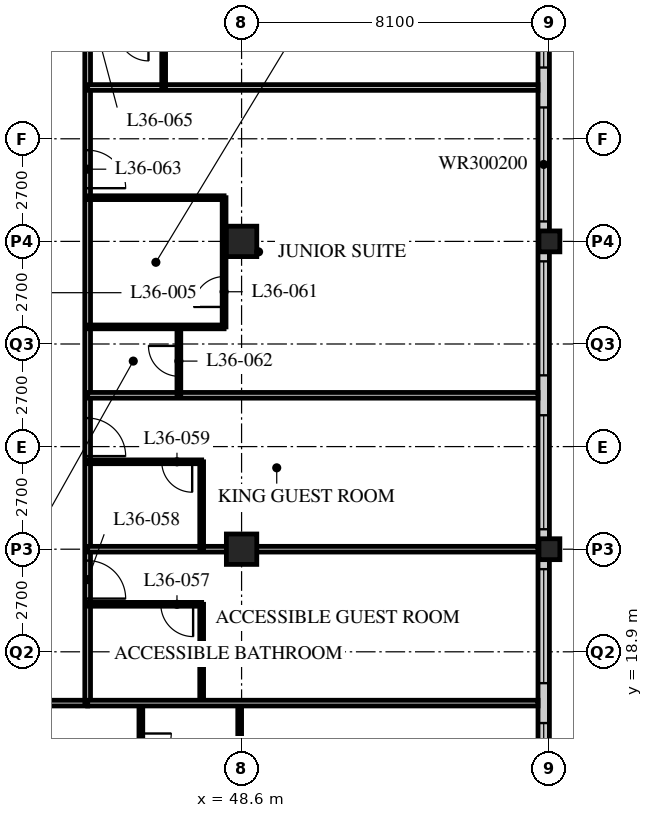
"""IFC4 building model, lengths in metres.
Left out: names, types, materials, properties, quantities, classifications, styles, units other than length and angle.
Written with IfcOpenShell. Run it as: python <this file> out.ifc"""

import sys

from ifc_helpers import new_model, si_unit, direction, frame, frame_2d, origin, origin_2d, place, context, subcontext, project, spatial, rectangle, hollow_rectangle, extrude, element, fill, save


model = new_model("IFC4")
c1 = context("Model", 3, precision=1e-05, world=origin(), true_north=direction((0.0, 1.0)))
c2 = subcontext(c1, "Body", "Model", "MODEL_VIEW")
j1 = project(units=[si_unit("LENGTHUNIT", "METRE"), si_unit("PLANEANGLEUNIT", "RADIAN")], contexts=[c1])
p1 = place(None, origin())
s1 = spatial("IfcSite", under=j1, at=p1, CompositionType="ELEMENT")
p2 = place(p1, origin())
s2 = spatial("IfcBuilding", under=s1, at=p2, CompositionType="ELEMENT")
p3 = place(p2, frame((0.0, 0.0, 140.8)))
s3 = spatial("IfcBuildingStorey", under=s2, at=p3, CompositionType="ELEMENT", Elevation=140.8)
for number, where, z_axis, x_axis in (
    (1, (48.6, 21.6, 0.0), (0.0, 0.0, 1.0), (1.0, 0.0, 0.0)),
    (2, (48.6, 29.7, 0.0), (0.0, 0.0, 1.0), (1.0, 0.0, 0.0)),
):
    element("IfcColumn", number, at=place(p3, frame(where, z_axis=z_axis, x_axis=x_axis)), inside=s3, PredefinedType="COLUMN", context=c2, shape_type="SweptSolid", body=[
        extrude(hollow_rectangle(XDim=0.8, YDim=0.8, WallThickness=0.08, at=origin_2d()), origin(), (0.0, 0.0, 1.0), 3.4),
    ])
for number, where, z_axis, x_axis in (
    (3, (56.7, 21.6, 0.0), (0.0, 0.0, 1.0), (1.0, 0.0, 0.0)),
    (4, (56.7, 29.7, 0.0), (0.0, 0.0, 1.0), (1.0, 0.0, 0.0)),
):
    element("IfcColumn", number, at=place(p3, frame(where, z_axis=z_axis, x_axis=x_axis)), inside=s3, PredefinedType="COLUMN", context=c2, shape_type="SweptSolid", body=[
        extrude(hollow_rectangle(XDim=0.55, YDim=0.55, WallThickness=0.04, at=origin_2d()), origin(), (0.0, 0.0, 1.0), 3.4),
    ])
p4 = place(p3, frame((56.55, 13.8, 0.0), z_axis=(0.0, 0.0, 1.0), x_axis=(0.0, 1.0, 0.0)))
e5 = element("IfcWall", 5, at=p4, inside=s3, PredefinedType="SOLIDWALL", context=c2, shape_type="SweptSolid", body=[
    extrude(rectangle(XDim=32.1, YDim=0.3, at=frame_2d((16.05, 0.0))), origin(), (0.0, 0.0, 1.0), 3.19),
])
p5 = place(p4, frame((0.225, 0.0, 0.9)))
e6 = element("IfcOpeningElement", 6, at=p5, cuts=e5, PredefinedType="OPENING", context=c2, shape_type="SweptSolid", body=[
    extrude(rectangle(XDim=3.0, YDim=2.0, at=frame_2d((1.5, 1.0))), frame((0.0, 0.16, 0.0), z_axis=(0.0, -1.0, 0.0), x_axis=(1.0, 0.0, 0.0)), (0.0, 0.0, 1.0), 0.32),
])
p6 = place(p4, frame((4.275, 0.0, 0.9)))
e7 = element("IfcOpeningElement", 7, at=p6, cuts=e5, PredefinedType="OPENING", context=c2, shape_type="SweptSolid", body=[
    extrude(rectangle(XDim=3.0, YDim=2.0, at=frame_2d((1.5, 1.0))), frame((0.0, 0.16, 0.0), z_axis=(0.0, -1.0, 0.0), x_axis=(1.0, 0.0, 0.0)), (0.0, 0.0, 1.0), 0.32),
])
p7 = place(p4, frame((8.325, 0.0, 0.9)))
e8 = element("IfcOpeningElement", 8, at=p7, cuts=e5, PredefinedType="OPENING", context=c2, shape_type="SweptSolid", body=[
    extrude(rectangle(XDim=3.0, YDim=2.0, at=frame_2d((1.5, 1.0))), frame((0.0, 0.16, 0.0), z_axis=(0.0, -1.0, 0.0), x_axis=(1.0, 0.0, 0.0)), (0.0, 0.0, 1.0), 0.32),
])
p8 = place(p4, frame((12.375, 0.0, 0.9)))
e9 = element("IfcOpeningElement", 9, at=p8, cuts=e5, PredefinedType="OPENING", context=c2, shape_type="SweptSolid", body=[
    extrude(rectangle(XDim=3.0, YDim=2.0, at=frame_2d((1.5, 1.0))), frame((0.0, 0.16, 0.0), z_axis=(0.0, -1.0, 0.0), x_axis=(1.0, 0.0, 0.0)), (0.0, 0.0, 1.0), 0.32),
])
p9 = place(p4, frame((16.425, 0.0, 0.9)))
e10 = element("IfcOpeningElement", 10, at=p9, cuts=e5, PredefinedType="OPENING", context=c2, shape_type="SweptSolid", body=[
    extrude(rectangle(XDim=3.0, YDim=2.0, at=frame_2d((1.5, 1.0))), frame((0.0, 0.16, 0.0), z_axis=(0.0, -1.0, 0.0), x_axis=(1.0, 0.0, 0.0)), (0.0, 0.0, 1.0), 0.32),
])
p10 = place(p4, frame((20.475, 0.0, 0.9)))
e11 = element("IfcOpeningElement", 11, at=p10, cuts=e5, PredefinedType="OPENING", context=c2, shape_type="SweptSolid", body=[
    extrude(rectangle(XDim=3.0, YDim=2.0, at=frame_2d((1.5, 1.0))), frame((0.0, 0.16, 0.0), z_axis=(0.0, -1.0, 0.0), x_axis=(1.0, 0.0, 0.0)), (0.0, 0.0, 1.0), 0.32),
])
p11 = place(p4, frame((24.525, 0.0, 0.9)))
e12 = element("IfcOpeningElement", 12, at=p11, cuts=e5, PredefinedType="OPENING", context=c2, shape_type="SweptSolid", body=[
    extrude(rectangle(XDim=3.0, YDim=2.0, at=frame_2d((1.5, 1.0))), frame((0.0, 0.16, 0.0), z_axis=(0.0, -1.0, 0.0), x_axis=(1.0, 0.0, 0.0)), (0.0, 0.0, 1.0), 0.32),
])
p12 = place(p4, frame((28.575, 0.0, 0.9)))
e13 = element("IfcOpeningElement", 13, at=p12, cuts=e5, PredefinedType="OPENING", context=c2, shape_type="SweptSolid", body=[
    extrude(rectangle(XDim=3.0, YDim=2.0, at=frame_2d((1.5, 1.0))), frame((0.0, 0.16, 0.0), z_axis=(0.0, -1.0, 0.0), x_axis=(1.0, 0.0, 0.0)), (0.0, 0.0, 1.0), 0.32),
])
p13 = place(p3, frame((8.1, 17.55, 0.0), z_axis=(0.0, 0.0, 1.0), x_axis=(1.0, 0.0, 0.0)))
e14 = element("IfcWall", 14, at=p13, inside=s3, PredefinedType="PARTITIONING", context=c2, shape_type="SweptSolid", body=[
    extrude(rectangle(XDim=36.45, YDim=0.15, at=frame_2d((18.225, 0.0))), origin(), (0.0, 0.0, 1.0), 3.19),
])
p14 = place(p13, frame((9.625, 0.0, 0.0)))
e15 = element("IfcOpeningElement", 15, at=p14, cuts=e14, PredefinedType="OPENING", context=c2, shape_type="SweptSolid", body=[
    extrude(rectangle(XDim=1.0, YDim=2.1, at=frame_2d((0.5, 1.05))), frame((0.0, 0.085, 0.0), z_axis=(0.0, -1.0, 0.0), x_axis=(1.0, 0.0, 0.0)), (0.0, 0.0, 1.0), 0.17),
])
p15 = place(p13, frame((18.1, 0.0, 0.0)))
e16 = element("IfcOpeningElement", 16, at=p15, cuts=e14, PredefinedType="OPENING", context=c2, shape_type="SweptSolid", body=[
    extrude(rectangle(XDim=1.0, YDim=2.1, at=frame_2d((0.5, 1.05))), frame((0.0, 0.085, 0.0), z_axis=(0.0, -1.0, 0.0), x_axis=(1.0, 0.0, 0.0)), (0.0, 0.0, 1.0), 0.17),
])
p16 = place(p13, frame((26.75, 0.0, 0.0)))
e17 = element("IfcOpeningElement", 17, at=p16, cuts=e14, PredefinedType="OPENING", context=c2, shape_type="SweptSolid", body=[
    extrude(rectangle(XDim=1.0, YDim=2.1, at=frame_2d((0.5, 1.05))), frame((0.0, 0.085, 0.0), z_axis=(0.0, -1.0, 0.0), x_axis=(1.0, 0.0, 0.0)), (0.0, 0.0, 1.0), 0.17),
])
p17 = place(p13, frame((30.8, 0.0, 0.0)))
e18 = element("IfcOpeningElement", 18, at=p17, cuts=e14, PredefinedType="OPENING", context=c2, shape_type="SweptSolid", body=[
    extrude(rectangle(XDim=1.0, YDim=2.1, at=frame_2d((0.5, 1.05))), frame((0.0, 0.085, 0.0), z_axis=(0.0, -1.0, 0.0), x_axis=(1.0, 0.0, 0.0)), (0.0, 0.0, 1.0), 0.17),
])
p18 = place(p13, frame((1.525, 0.0, 0.0)))
e19 = element("IfcOpeningElement", 19, at=p18, cuts=e14, PredefinedType="OPENING", context=c2, shape_type="SweptSolid", body=[
    extrude(rectangle(XDim=1.0, YDim=2.1, at=frame_2d((0.5, 1.05))), frame((0.0, 0.085, 0.0), z_axis=(0.0, -1.0, 0.0), x_axis=(1.0, 0.0, 0.0)), (0.0, 0.0, 1.0), 0.17),
])
p19 = place(p13, frame((33.925, 0.0, 0.0)))
e20 = element("IfcOpeningElement", 20, at=p19, cuts=e14, PredefinedType="OPENING", context=c2, shape_type="SweptSolid", body=[
    extrude(rectangle(XDim=1.0, YDim=2.1, at=frame_2d((0.5, 1.05))), frame((0.0, 0.085, 0.0), z_axis=(0.0, -1.0, 0.0), x_axis=(1.0, 0.0, 0.0)), (0.0, 0.0, 1.0), 0.17),
])
p20 = place(p3, frame((44.55, 17.55, 0.0), z_axis=(0.0, 0.0, 1.0), x_axis=(0.0, 1.0, 0.0)))
e21 = element("IfcWall", 21, at=p20, inside=s3, PredefinedType="PARTITIONING", context=c2, shape_type="SweptSolid", body=[
    extrude(rectangle(XDim=28.35, YDim=0.15, at=frame_2d((14.175, 0.0))), origin(), (0.0, 0.0, 1.0), 3.19),
])
p21 = place(p20, frame((2.75, 0.0, 0.0)))
e22 = element("IfcOpeningElement", 22, at=p21, cuts=e21, PredefinedType="OPENING", context=c2, shape_type="SweptSolid", body=[
    extrude(rectangle(XDim=1.0, YDim=2.1, at=frame_2d((0.5, 1.05))), frame((0.0, 0.085, 0.0), z_axis=(0.0, -1.0, 0.0), x_axis=(1.0, 0.0, 0.0)), (0.0, 0.0, 1.0), 0.17),
])
p22 = place(p20, frame((6.5, 0.0, 0.0)))
e23 = element("IfcOpeningElement", 23, at=p22, cuts=e21, PredefinedType="OPENING", context=c2, shape_type="SweptSolid", body=[
    extrude(rectangle(XDim=1.0, YDim=2.1, at=frame_2d((0.5, 1.05))), frame((0.0, 0.085, 0.0), z_axis=(0.0, -1.0, 0.0), x_axis=(1.0, 0.0, 0.0)), (0.0, 0.0, 1.0), 0.17),
])
p23 = place(p20, frame((13.55, 0.0, 0.0)))
e24 = element("IfcOpeningElement", 24, at=p23, cuts=e21, PredefinedType="OPENING", context=c2, shape_type="SweptSolid", body=[
    extrude(rectangle(XDim=1.0, YDim=2.1, at=frame_2d((0.5, 1.05))), frame((0.0, 0.085, 0.0), z_axis=(0.0, -1.0, 0.0), x_axis=(1.0, 0.0, 0.0)), (0.0, 0.0, 1.0), 0.17),
])
p24 = place(p20, frame((18.1, 0.0, 0.0)))
e25 = element("IfcOpeningElement", 25, at=p24, cuts=e21, PredefinedType="OPENING", context=c2, shape_type="SweptSolid", body=[
    extrude(rectangle(XDim=1.0, YDim=2.1, at=frame_2d((0.5, 1.05))), frame((0.0, 0.085, 0.0), z_axis=(0.0, -1.0, 0.0), x_axis=(1.0, 0.0, 0.0)), (0.0, 0.0, 1.0), 0.17),
])
p25 = place(p20, frame((26.75, 0.0, 0.0)))
e26 = element("IfcOpeningElement", 26, at=p25, cuts=e21, PredefinedType="OPENING", context=c2, shape_type="SweptSolid", body=[
    extrude(rectangle(XDim=1.0, YDim=2.1, at=frame_2d((0.5, 1.05))), frame((0.0, 0.085, 0.0), z_axis=(0.0, -1.0, 0.0), x_axis=(1.0, 0.0, 0.0)), (0.0, 0.0, 1.0), 0.17),
])
p26 = place(p3, frame((47.55, 17.55, 0.0), z_axis=(0.0, 0.0, 1.0), x_axis=(0.0, 1.0, 0.0)))
e27 = element("IfcWall", 27, at=p26, inside=s3, PredefinedType="PARTITIONING", context=c2, shape_type="SweptSolid", body=[
    extrude(rectangle(XDim=2.6, YDim=0.1, at=frame_2d((1.3, 0.0))), origin(), (0.0, 0.0, 1.0), 3.19),
])
p27 = place(p3, frame((44.55, 20.15, 0.0), z_axis=(0.0, 0.0, 1.0), x_axis=(1.0, 0.0, 0.0)))
e28 = element("IfcWall", 28, at=p27, inside=s3, PredefinedType="PARTITIONING", context=c2, shape_type="SweptSolid", body=[
    extrude(rectangle(XDim=3.0, YDim=0.1, at=frame_2d((1.5, 0.0))), origin(), (0.0, 0.0, 1.0), 3.19),
])
p28 = place(p27, frame((1.925, 0.0, 0.0)))
e29 = element("IfcOpeningElement", 29, at=p28, cuts=e28, PredefinedType="OPENING", context=c2, shape_type="SweptSolid", body=[
    extrude(rectangle(XDim=0.85, YDim=2.1, at=frame_2d((0.425, 1.05))), frame((0.0, 0.06, 0.0), z_axis=(0.0, -1.0, 0.0), x_axis=(1.0, 0.0, 0.0)), (0.0, 0.0, 1.0), 0.12),
])
p29 = place(p3, frame((44.55, 21.6, 0.0), z_axis=(0.0, 0.0, 1.0), x_axis=(1.0, 0.0, 0.0)))
e30 = element("IfcWall", 30, at=p29, inside=s3, PredefinedType="PARTITIONING", context=c2, shape_type="SweptSolid", body=[
    extrude(rectangle(XDim=11.85, YDim=0.15, at=frame_2d((5.925, 0.0))), origin(), (0.0, 0.0, 1.0), 2.578),
])
p30 = place(p3, frame((47.55, 21.6, 0.0), z_axis=(0.0, 0.0, 1.0), x_axis=(0.0, 1.0, 0.0)))
e31 = element("IfcWall", 31, at=p30, inside=s3, PredefinedType="PARTITIONING", context=c2, shape_type="SweptSolid", body=[
    extrude(rectangle(XDim=2.3, YDim=0.1, at=frame_2d((1.15, 0.0))), origin(), (0.0, 0.0, 1.0), 3.19),
])
p31 = place(p3, frame((44.55, 23.9, 0.0), z_axis=(0.0, 0.0, 1.0), x_axis=(1.0, 0.0, 0.0)))
e32 = element("IfcWall", 32, at=p31, inside=s3, PredefinedType="PARTITIONING", context=c2, shape_type="SweptSolid", body=[
    extrude(rectangle(XDim=3.0, YDim=0.1, at=frame_2d((1.5, 0.0))), origin(), (0.0, 0.0, 1.0), 3.19),
])
p32 = place(p31, frame((1.95, 0.0, 0.0)))
e33 = element("IfcOpeningElement", 33, at=p32, cuts=e32, PredefinedType="OPENING", context=c2, shape_type="SweptSolid", body=[
    extrude(rectangle(XDim=0.8, YDim=2.1, at=frame_2d((0.4, 1.05))), frame((0.0, 0.06, 0.0), z_axis=(0.0, -1.0, 0.0), x_axis=(1.0, 0.0, 0.0)), (0.0, 0.0, 1.0), 0.12),
])
p33 = place(p3, frame((44.55, 25.65, 0.0), z_axis=(0.0, 0.0, 1.0), x_axis=(1.0, 0.0, 0.0)))
e34 = element("IfcWall", 34, at=p33, inside=s3, PredefinedType="PARTITIONING", context=c2, shape_type="SweptSolid", body=[
    extrude(rectangle(XDim=11.85, YDim=0.15, at=frame_2d((5.925, 0.0))), origin(), (0.0, 0.0, 1.0), 3.19),
])
p34 = place(p3, frame((48.14, 27.45, 0.0), z_axis=(0.0, 0.0, 1.0), x_axis=(0.0, 1.0, 0.0)))
e35 = element("IfcWall", 35, at=p34, inside=s3, PredefinedType="PARTITIONING", context=c2, shape_type="SweptSolid", body=[
    extrude(rectangle(XDim=3.4, YDim=0.1, at=frame_2d((1.7, 0.0))), origin(), (0.0, 0.0, 1.0), 3.19),
])
p35 = place(p34, frame((0.525, 0.0, 0.0)))
e36 = element("IfcOpeningElement", 36, at=p35, cuts=e35, PredefinedType="OPENING", context=c2, shape_type="SweptSolid", body=[
    extrude(rectangle(XDim=0.8, YDim=2.1, at=frame_2d((0.4, 1.05))), frame((0.0, 0.06, 0.0), z_axis=(0.0, -1.0, 0.0), x_axis=(1.0, 0.0, 0.0)), (0.0, 0.0, 1.0), 0.12),
])
p36 = place(p3, frame((46.95, 25.65, 0.0), z_axis=(0.0, 0.0, 1.0), x_axis=(0.0, 1.0, 0.0)))
e37 = element("IfcWall", 37, at=p36, inside=s3, PredefinedType="PARTITIONING", context=c2, shape_type="SweptSolid", body=[
    extrude(rectangle(XDim=1.8, YDim=0.1, at=frame_2d((0.9, 0.0))), origin(), (0.0, 0.0, 1.0), 3.19),
])
p37 = place(p36, frame((0.5, 0.0, 0.0)))
e38 = element("IfcOpeningElement", 38, at=p37, cuts=e37, PredefinedType="OPENING", context=c2, shape_type="SweptSolid", body=[
    extrude(rectangle(XDim=0.8, YDim=2.1, at=frame_2d((0.4, 1.05))), frame((0.0, 0.06, 0.0), z_axis=(0.0, -1.0, 0.0), x_axis=(1.0, 0.0, 0.0)), (0.0, 0.0, 1.0), 0.12),
])
for number, where, z_axis, x_axis in (
    (39, (44.55, 27.45, 0.0), (0.0, 0.0, 1.0), (1.0, 0.0, 0.0)),
    (40, (44.55, 30.85, 0.0), (0.0, 0.0, 1.0), (1.0, 0.0, 0.0)),
):
    element("IfcWall", number, at=place(p3, frame(where, z_axis=z_axis, x_axis=x_axis)), inside=s3, PredefinedType="PARTITIONING", context=c2, shape_type="SweptSolid", body=[
        extrude(rectangle(XDim=3.59, YDim=0.1, at=frame_2d((1.795, 0.0))), origin(), (0.0, 0.0, 1.0), 3.19),
    ])
p38 = place(p3, frame((44.55, 33.75, 0.0), z_axis=(0.0, 0.0, 1.0), x_axis=(1.0, 0.0, 0.0)))
e41 = element("IfcWall", 41, at=p38, inside=s3, PredefinedType="PARTITIONING", context=c2, shape_type="SweptSolid", body=[
    extrude(rectangle(XDim=11.85, YDim=0.15, at=frame_2d((5.925, 0.0))), origin(), (0.0, 0.0, 1.0), 3.19),
])
p39 = place(p3, frame((46.55, 33.75, 0.0), z_axis=(0.0, 0.0, 1.0), x_axis=(0.0, 1.0, 0.0)))
e42 = element("IfcWall", 42, at=p39, inside=s3, PredefinedType="PARTITIONING", context=c2, shape_type="SweptSolid", body=[
    extrude(rectangle(XDim=1.5, YDim=0.1, at=frame_2d((0.75, 0.0))), origin(), (0.0, 0.0, 1.0), 3.19),
])
p40 = place(p3, frame((45.95, 17.55, 0.0), z_axis=(0.0, 0.0, 1.0), x_axis=(0.0, -1.0, 0.0)))
e43 = element("IfcWall", 43, at=p40, inside=s3, PredefinedType="PARTITIONING", context=c2, shape_type="SweptSolid", body=[
    extrude(rectangle(XDim=2.4, YDim=0.1, at=frame_2d((1.2, 0.0))), origin(), (0.0, 0.0, 1.0), 3.19),
])
p41 = place(p40, frame((0.8, 0.0, 0.0)))
e44 = element("IfcOpeningElement", 44, at=p41, cuts=e43, PredefinedType="OPENING", context=c2, shape_type="SweptSolid", body=[
    extrude(rectangle(XDim=0.8, YDim=2.1, at=frame_2d((0.4, 1.05))), frame((0.0, 0.06, 0.0), z_axis=(0.0, -1.0, 0.0), x_axis=(1.0, 0.0, 0.0)), (0.0, 0.0, 1.0), 0.12),
])
p42 = place(p3, frame((48.55, 17.55, 0.0), z_axis=(0.0, 0.0, 1.0), x_axis=(0.0, -1.0, 0.0)))
e45 = element("IfcWall", 45, at=p42, inside=s3, PredefinedType="PARTITIONING", context=c2, shape_type="SweptSolid", body=[
    extrude(rectangle(XDim=2.4, YDim=0.1, at=frame_2d((1.2, 0.0))), origin(), (0.0, 0.0, 1.0), 2.578),
])
p43 = place(p3, frame((44.55, 17.55, 0.0), z_axis=(0.0, 0.0, 1.0), x_axis=(1.0, 0.0, 0.0)))
e46 = element("IfcWall", 46, at=p43, inside=s3, PredefinedType="PARTITIONING", context=c2, shape_type="SweptSolid", body=[
    extrude(rectangle(XDim=11.85, YDim=0.15, at=frame_2d((5.925, 0.0))), origin(), (0.0, 0.0, 1.0), 3.19),
])
p44 = place(p5, origin())
e47 = element("IfcWindow", 47, at=p44, inside=s3, PartitioningType="SINGLE_PANEL", PredefinedType="WINDOW", context=c2, shape_type="SweptSolid", body=[
    extrude(rectangle(XDim=3.0, YDim=2.0, at=frame_2d((1.5, 1.0))), frame((0.0, 0.03, 0.0), z_axis=(0.0, -1.0, 0.0), x_axis=(1.0, 0.0, 0.0)), (0.0, 0.0, 1.0), 0.06),
])
fill(e6, e47)
p45 = place(p6, origin())
e48 = element("IfcWindow", 48, at=p45, inside=s3, PartitioningType="SINGLE_PANEL", PredefinedType="WINDOW", context=c2, shape_type="SweptSolid", body=[
    extrude(rectangle(XDim=3.0, YDim=2.0, at=frame_2d((1.5, 1.0))), frame((0.0, 0.03, 0.0), z_axis=(0.0, -1.0, 0.0), x_axis=(1.0, 0.0, 0.0)), (0.0, 0.0, 1.0), 0.06),
])
fill(e7, e48)
p46 = place(p7, origin())
e49 = element("IfcWindow", 49, at=p46, inside=s3, PartitioningType="SINGLE_PANEL", PredefinedType="WINDOW", context=c2, shape_type="SweptSolid", body=[
    extrude(rectangle(XDim=3.0, YDim=2.0, at=frame_2d((1.5, 1.0))), frame((0.0, 0.03, 0.0), z_axis=(0.0, -1.0, 0.0), x_axis=(1.0, 0.0, 0.0)), (0.0, 0.0, 1.0), 0.06),
])
fill(e8, e49)
p47 = place(p8, origin())
e50 = element("IfcWindow", 50, at=p47, inside=s3, PartitioningType="SINGLE_PANEL", PredefinedType="WINDOW", context=c2, shape_type="SweptSolid", body=[
    extrude(rectangle(XDim=3.0, YDim=2.0, at=frame_2d((1.5, 1.0))), frame((0.0, 0.03, 0.0), z_axis=(0.0, -1.0, 0.0), x_axis=(1.0, 0.0, 0.0)), (0.0, 0.0, 1.0), 0.06),
])
fill(e9, e50)
p48 = place(p9, origin())
e51 = element("IfcWindow", 51, at=p48, inside=s3, PartitioningType="SINGLE_PANEL", PredefinedType="WINDOW", context=c2, shape_type="SweptSolid", body=[
    extrude(rectangle(XDim=3.0, YDim=2.0, at=frame_2d((1.5, 1.0))), frame((0.0, 0.03, 0.0), z_axis=(0.0, -1.0, 0.0), x_axis=(1.0, 0.0, 0.0)), (0.0, 0.0, 1.0), 0.06),
])
fill(e10, e51)
p49 = place(p10, origin())
e52 = element("IfcWindow", 52, at=p49, inside=s3, PartitioningType="SINGLE_PANEL", PredefinedType="WINDOW", context=c2, shape_type="SweptSolid", body=[
    extrude(rectangle(XDim=3.0, YDim=2.0, at=frame_2d((1.5, 1.0))), frame((0.0, 0.03, 0.0), z_axis=(0.0, -1.0, 0.0), x_axis=(1.0, 0.0, 0.0)), (0.0, 0.0, 1.0), 0.06),
])
fill(e11, e52)
p50 = place(p28, origin())
e53 = element("IfcDoor", 53, at=p50, inside=s3, OperationType="SINGLE_SWING_LEFT", PredefinedType="DOOR", context=c2, shape_type="SweptSolid", body=[
    extrude(rectangle(XDim=0.85, YDim=2.1, at=frame_2d((0.425, 1.05))), frame((0.0, 0.025, 0.0), z_axis=(0.0, -1.0, 0.0), x_axis=(1.0, 0.0, 0.0)), (0.0, 0.0, 1.0), 0.05),
])
fill(e29, e53)
p51 = place(p21, origin())
e54 = element("IfcDoor", 54, at=p51, inside=s3, OperationType="SINGLE_SWING_RIGHT", PredefinedType="DOOR", context=c2, shape_type="SweptSolid", body=[
    extrude(rectangle(XDim=1.0, YDim=2.1, at=frame_2d((0.5, 1.05))), frame((0.0, 0.025, 0.0), z_axis=(0.0, -1.0, 0.0), x_axis=(1.0, 0.0, 0.0)), (0.0, 0.0, 1.0), 0.05),
])
fill(e22, e54)
p52 = place(p32, origin())
e55 = element("IfcDoor", 55, at=p52, inside=s3, OperationType="SINGLE_SWING_LEFT", PredefinedType="DOOR", context=c2, shape_type="SweptSolid", body=[
    extrude(rectangle(XDim=0.8, YDim=2.1, at=frame_2d((0.4, 1.05))), frame((0.0, 0.025, 0.0), z_axis=(0.0, -1.0, 0.0), x_axis=(1.0, 0.0, 0.0)), (0.0, 0.0, 1.0), 0.05),
])
fill(e33, e55)
p53 = place(p22, origin())
e56 = element("IfcDoor", 56, at=p53, inside=s3, OperationType="SINGLE_SWING_RIGHT", PredefinedType="DOOR", context=c2, shape_type="SweptSolid", body=[
    extrude(rectangle(XDim=1.0, YDim=2.1, at=frame_2d((0.5, 1.05))), frame((0.0, 0.025, 0.0), z_axis=(0.0, -1.0, 0.0), x_axis=(1.0, 0.0, 0.0)), (0.0, 0.0, 1.0), 0.05),
])
fill(e23, e56)
p54 = place(p35, origin())
e57 = element("IfcDoor", 57, at=p54, inside=s3, OperationType="SINGLE_SWING_LEFT", PredefinedType="DOOR", context=c2, shape_type="SweptSolid", body=[
    extrude(rectangle(XDim=0.8, YDim=2.1, at=frame_2d((0.4, 1.05))), frame((0.0, 0.025, 0.0), z_axis=(0.0, -1.0, 0.0), x_axis=(1.0, 0.0, 0.0)), (0.0, 0.0, 1.0), 0.05),
])
fill(e36, e57)
p55 = place(p37, origin())
e58 = element("IfcDoor", 58, at=p55, inside=s3, OperationType="SINGLE_SWING_RIGHT", PredefinedType="DOOR", context=c2, shape_type="SweptSolid", body=[
    extrude(rectangle(XDim=0.8, YDim=2.1, at=frame_2d((0.4, 1.05))), frame((0.0, 0.025, 0.0), z_axis=(0.0, -1.0, 0.0), x_axis=(1.0, 0.0, 0.0)), (0.0, 0.0, 1.0), 0.05),
])
fill(e38, e58)
p56 = place(p23, origin())
e59 = element("IfcDoor", 59, at=p56, inside=s3, OperationType="SINGLE_SWING_RIGHT", PredefinedType="DOOR", context=c2, shape_type="SweptSolid", body=[
    extrude(rectangle(XDim=1.0, YDim=2.1, at=frame_2d((0.5, 1.05))), frame((0.0, 0.025, 0.0), z_axis=(0.0, -1.0, 0.0), x_axis=(1.0, 0.0, 0.0)), (0.0, 0.0, 1.0), 0.05),
])
fill(e24, e59)
p57 = place(p41, origin())
e60 = element("IfcDoor", 60, at=p57, inside=s3, OperationType="SINGLE_SWING_LEFT", PredefinedType="DOOR", context=c2, shape_type="SweptSolid", body=[
    extrude(rectangle(XDim=0.8, YDim=2.1, at=frame_2d((0.4, 1.05))), frame((0.0, 0.025, 0.0), z_axis=(0.0, -1.0, 0.0), x_axis=(1.0, 0.0, 0.0)), (0.0, 0.0, 1.0), 0.05),
])
fill(e44, e60)
save(model, sys.argv[1])
